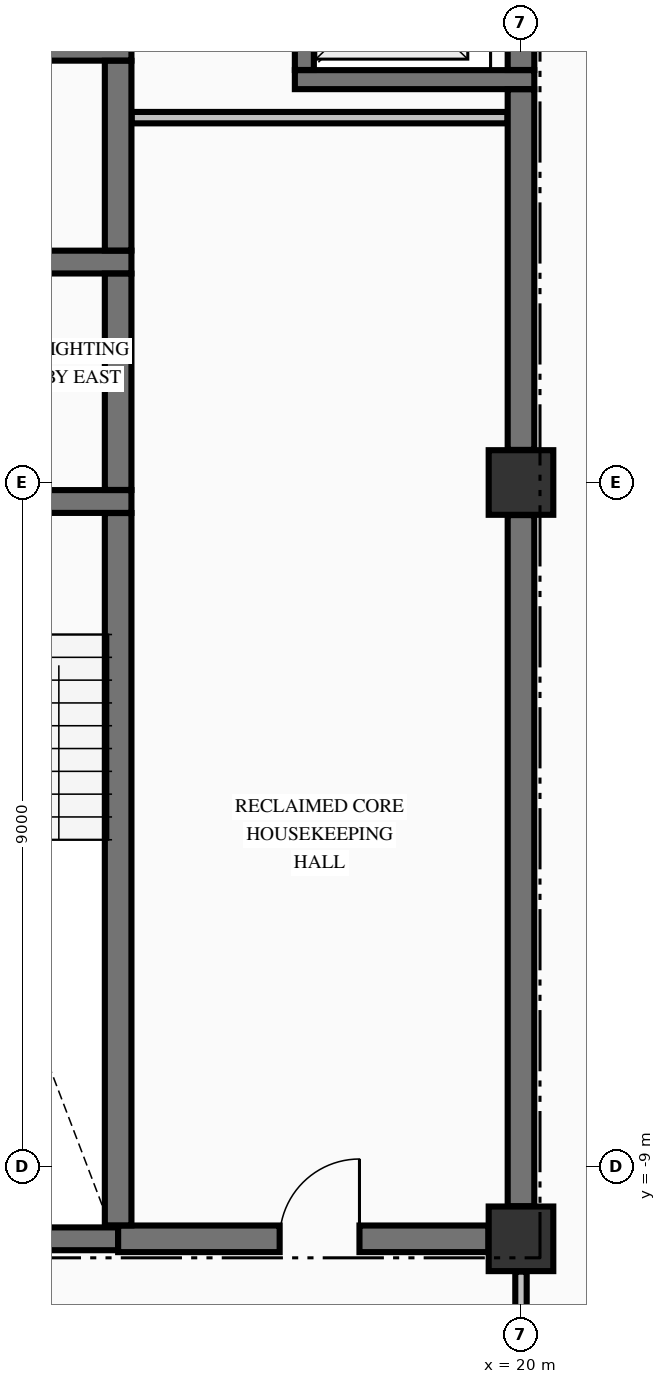
"""IFC4 building model, lengths in metres.
Left out: names, types, materials, properties, quantities, classifications, styles, units other than length and angle.
Written with IfcOpenShell. Run it as: python <this file> out.ifc"""

import sys

from ifc_helpers import new_model, si_unit, direction, frame, frame_2d, origin, origin_2d, place, context, subcontext, project, spatial, rectangle, extrude, element, fill, save


model = new_model("IFC4")
c1 = context("Model", 3, precision=1e-05, world=origin(), true_north=direction((0.0, 1.0)))
c2 = subcontext(c1, "Body", "Model", "MODEL_VIEW")
j1 = project(units=[si_unit("LENGTHUNIT", "METRE"), si_unit("PLANEANGLEUNIT", "RADIAN")], contexts=[c1])
p1 = place(None, origin())
s1 = spatial("IfcSite", under=j1, at=p1, CompositionType="ELEMENT")
p2 = place(p1, origin())
s2 = spatial("IfcBuilding", under=s1, at=p2, CompositionType="ELEMENT")
p3 = place(p2, frame((0.0, 0.0, 194.86)))
s3 = spatial("IfcBuildingStorey", under=s2, at=p3, CompositionType="ELEMENT", Elevation=194.86)
for number, where, z_axis, x_axis in (
    (1, (20.0, -9.95, -0.275), (0.0, 0.0, 1.0), (1.0, 0.0, 0.0)),
    (2, (20.0, 0.0, -0.275), (0.0, 0.0, 1.0), (1.0, 0.0, 0.0)),
):
    element("IfcColumn", number, at=place(p3, frame(where, z_axis=z_axis, x_axis=x_axis)), inside=s3, PredefinedType="COLUMN", context=c2, shape_type="SweptSolid", body=[
        extrude(rectangle(XDim=0.85, YDim=0.85, at=origin_2d()), origin(), (0.0, 0.0, 1.0), 3.425),
    ])
p4 = place(p3, frame((11.429, -9.95, 0.0), z_axis=(0.0, 0.0, 1.0), x_axis=(1.0, 0.0, 0.0)))
e3 = element("IfcWall", 3, at=p4, inside=s3, PredefinedType="SHEAR", context=c2, shape_type="SweptSolid", body=[
    extrude(rectangle(XDim=3.271, YDim=0.3, at=frame_2d((1.635, 0.0))), origin(), (0.0, 0.0, 1.0), 3.15),
])
p5 = place(p3, frame((14.7, -9.95, 0.0), z_axis=(0.0, 0.0, 1.0), x_axis=(1.0, 0.0, 0.0)))
e4 = element("IfcWall", 4, at=p5, inside=s3, PredefinedType="SHEAR", context=c2, shape_type="SweptSolid", body=[
    extrude(rectangle(XDim=4.871, YDim=0.35, at=frame_2d((2.436, 0.0))), origin(), (0.0, 0.0, 1.0), 3.15),
])
p6 = place(p5, frame((2.125, 0.0, 0.0)))
e5 = element("IfcOpeningElement", 5, at=p6, cuts=e4, PredefinedType="OPENING", context=c2, shape_type="SweptSolid", body=[
    extrude(rectangle(XDim=1.05, YDim=2.15, at=frame_2d((0.525, 1.075))), frame((0.0, 0.185, 0.0), z_axis=(0.0, -1.0, 0.0), x_axis=(1.0, 0.0, 0.0)), (0.0, 0.0, 1.0), 0.37),
])
p7 = place(p3, frame((11.429, -0.25, 0.0), z_axis=(0.0, 0.0, 1.0), x_axis=(1.0, 0.0, 0.0)))
e6 = element("IfcWall", 6, at=p7, inside=s3, PredefinedType="SHEAR", context=c2, shape_type="SweptSolid", body=[
    extrude(rectangle(XDim=3.446, YDim=0.3, at=frame_2d((1.723, 0.0))), origin(), (0.0, 0.0, 1.0), 3.15),
])
p8 = place(p7, frame((1.171, 0.0, 0.0)))
e7 = element("IfcOpeningElement", 7, at=p8, cuts=e6, PredefinedType="OPENING", context=c2, shape_type="SweptSolid", body=[
    extrude(rectangle(XDim=1.1, YDim=2.15, at=frame_2d((0.55, 1.075))), frame((0.0, 0.16, 0.0), z_axis=(0.0, -1.0, 0.0), x_axis=(1.0, 0.0, 0.0)), (0.0, 0.0, 1.0), 0.32),
])
p9 = place(p3, frame((10.85, 2.9, 0.0), z_axis=(0.0, 0.0, 1.0), x_axis=(1.0, 0.0, 0.0)))
e8 = element("IfcWall", 8, at=p9, inside=s3, PredefinedType="SHEAR", context=c2, shape_type="SweptSolid", body=[
    extrude(rectangle(XDim=4.025, YDim=0.3, at=frame_2d((2.012, 0.0))), origin(), (0.0, 0.0, 1.0), 3.15),
])
p10 = place(p9, frame((0.85, 0.0, 0.0)))
e9 = element("IfcOpeningElement", 9, at=p10, cuts=e8, PredefinedType="OPENING", context=c2, shape_type="SweptSolid", body=[
    extrude(rectangle(XDim=1.1, YDim=2.2, at=frame_2d((0.55, 1.1))), frame((0.0, 0.16, 0.0), z_axis=(0.0, -1.0, 0.0), x_axis=(1.0, 0.0, 0.0)), (0.0, 0.0, 1.0), 0.32),
])
p11 = place(p3, frame((17.025, 5.3, 0.0), z_axis=(0.0, 0.0, 1.0), x_axis=(1.0, 0.0, 0.0)))
e10 = element("IfcWall", 10, at=p11, inside=s3, PredefinedType="SOLIDWALL", context=c2, shape_type="SweptSolid", body=[
    extrude(rectangle(XDim=3.15, YDim=0.25, at=frame_2d((1.575, 0.0))), origin(), (0.0, 0.0, 1.0), 3.15),
])
p12 = place(p3, frame((10.85, 5.7, 0.0), z_axis=(0.0, 0.0, 1.0), x_axis=(1.0, 0.0, 0.0)))
e11 = element("IfcWall", 11, at=p12, inside=s3, PredefinedType="SHEAR", context=c2, shape_type="SweptSolid", body=[
    extrude(rectangle(XDim=4.025, YDim=0.3, at=frame_2d((2.012, 0.0))), origin(), (0.0, 0.0, 1.0), 3.15),
])
p13 = place(p3, frame((14.878, 4.8, 0.0), z_axis=(0.0, 0.0, 1.0), x_axis=(1.0, 0.0, 0.0)))
e12 = element("IfcWall", 12, at=p13, inside=s3, PredefinedType="PARTITIONING", context=c2, shape_type="SweptSolid", body=[
    extrude(rectangle(XDim=4.944, YDim=0.15, at=frame_2d((2.472, 0.0))), origin(), (0.0, 0.0, 1.0), 3.15),
])
p14 = place(p3, frame((14.7, -9.773, 0.0), z_axis=(0.0, 0.0, 1.0), x_axis=(0.0, 1.0, 0.0)))
e13 = element("IfcWall", 13, at=p14, inside=s3, PredefinedType="SHEAR", context=c2, shape_type="SweptSolid", body=[
    extrude(rectangle(XDim=9.371, YDim=0.35, at=frame_2d((4.686, 0.0))), origin(), (0.0, 0.0, 1.0), 3.15),
])
p15 = place(p3, frame((14.7, -0.098, 0.0), z_axis=(0.0, 0.0, 1.0), x_axis=(0.0, 1.0, 0.0)))
e14 = element("IfcWall", 14, at=p15, inside=s3, PredefinedType="SHEAR", context=c2, shape_type="SweptSolid", body=[
    extrude(rectangle(XDim=2.846, YDim=0.35, at=frame_2d((1.423, 0.0))), origin(), (0.0, 0.0, 1.0), 3.15),
])
p16 = place(p3, frame((14.7, 3.052, 0.0), z_axis=(0.0, 0.0, 1.0), x_axis=(0.0, 1.0, 0.0)))
e15 = element("IfcWall", 15, at=p16, inside=s3, PredefinedType="SHEAR", context=c2, shape_type="SweptSolid", body=[
    extrude(rectangle(XDim=2.496, YDim=0.35, at=frame_2d((1.248, 0.0))), origin(), (0.0, 0.0, 1.0), 3.15),
])
p17 = place(p3, frame((17.15, 5.427, 0.0), z_axis=(0.0, 0.0, 1.0), x_axis=(0.0, 1.0, 0.0)))
e16 = element("IfcWall", 16, at=p17, inside=s3, PredefinedType="SOLIDWALL", context=c2, shape_type="SweptSolid", body=[
    extrude(rectangle(XDim=2.196, YDim=0.25, at=frame_2d((1.098, 0.0))), origin(), (0.0, 0.0, 1.0), 3.15),
])
p18 = place(p17, frame((0.548, 0.0, 0.0)))
e17 = element("IfcOpeningElement", 17, at=p18, cuts=e16, PredefinedType="OPENING", context=c2, shape_type="SweptSolid", body=[
    extrude(rectangle(XDim=1.1, YDim=2.2, at=frame_2d((0.55, 1.1))), frame((0.0, 0.135, 0.0), z_axis=(0.0, -1.0, 0.0), x_axis=(1.0, 0.0, 0.0)), (0.0, 0.0, 1.0), 0.27),
])
p19 = place(p3, frame((20.0, -9.521, 0.0), z_axis=(0.0, 0.0, 1.0), x_axis=(0.0, 1.0, 0.0)))
e18 = element("IfcWall", 18, at=p19, inside=s3, PredefinedType="SHEAR", context=c2, shape_type="SweptSolid", body=[
    extrude(rectangle(XDim=9.092, YDim=0.35, at=frame_2d((4.546, 0.0))), origin(), (0.0, 0.0, 1.0), 3.15),
])
p20 = place(p3, frame((20.0, 0.429, 0.0), z_axis=(0.0, 0.0, 1.0), x_axis=(0.0, 1.0, 0.0)))
e19 = element("IfcWall", 19, at=p20, inside=s3, PredefinedType="SHEAR", context=c2, shape_type="SweptSolid", body=[
    extrude(rectangle(XDim=4.744, YDim=0.35, at=frame_2d((2.372, 0.0))), origin(), (0.0, 0.0, 1.0), 3.15),
])
p21 = place(p3, frame((20.0, 5.427, 0.0), z_axis=(0.0, 0.0, 1.0), x_axis=(0.0, 1.0, 0.0)))
e20 = element("IfcWall", 20, at=p21, inside=s3, PredefinedType="SHEAR", context=c2, shape_type="SweptSolid", body=[
    extrude(rectangle(XDim=2.196, YDim=0.35, at=frame_2d((1.098, 0.0))), origin(), (0.0, 0.0, 1.0), 3.15),
])
p22 = place(p3, frame((20.0, -12.122, 0.0), z_axis=(0.0, 0.0, 1.0), x_axis=(0.0, 1.0, 0.0)))
e21 = element("IfcWall", 21, at=p22, inside=s3, PredefinedType="PARTITIONING", context=c2, shape_type="SweptSolid", body=[
    extrude(rectangle(XDim=1.741, YDim=0.15, at=frame_2d((0.871, 0.0))), origin(), (0.0, 0.0, 1.0), 2.342),
])
p23 = place(p6, origin())
e22 = element("IfcDoor", 22, at=p23, inside=s3, OperationType="SINGLE_SWING_RIGHT", PredefinedType="DOOR", context=c2, shape_type="SweptSolid", body=[
    extrude(rectangle(XDim=1.05, YDim=2.15, at=frame_2d((0.525, 1.075))), frame((0.0, 0.025, 0.0), z_axis=(0.0, -1.0, 0.0), x_axis=(1.0, 0.0, 0.0)), (0.0, 0.0, 1.0), 0.05),
])
fill(e5, e22)
save(model, sys.argv[1])
